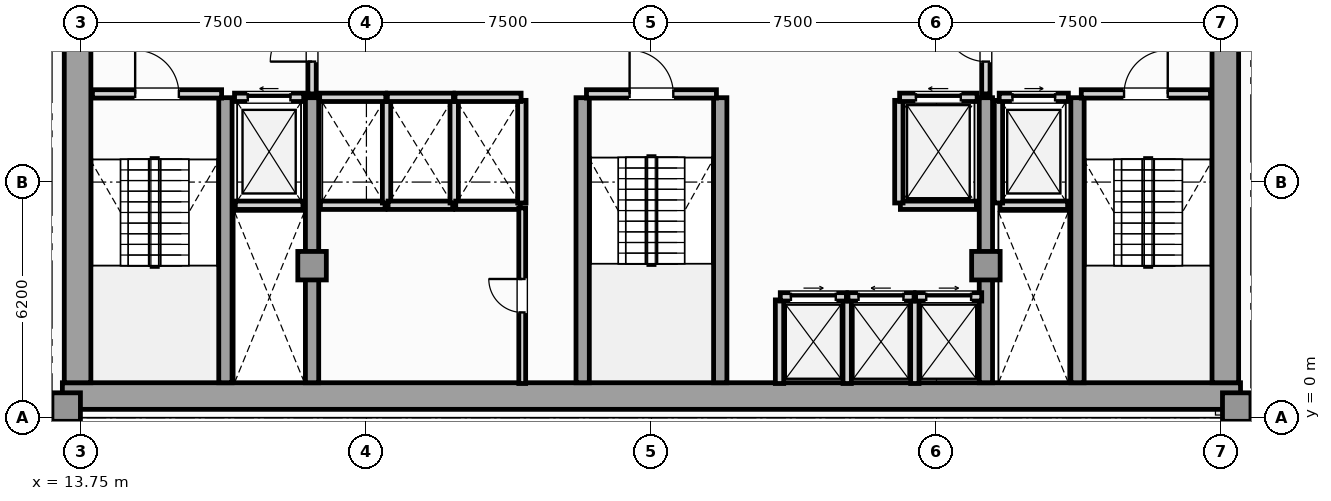
"""IFC4 building model, lengths in metres.
Left out: names, types, materials, properties, quantities, classifications, styles, units other than length and angle.
Written with IfcOpenShell. Run it as: python <this file> out.ifc"""

import sys

from ifc_helpers import new_model, si_unit, direction, frame, frame_2d, origin, origin_2d, place, context, subcontext, project, spatial, rectangle, extrude, element, fill, save


model = new_model("IFC4")
c1 = context("Model", 3, precision=1e-05, world=origin(), true_north=direction((0.0, 1.0)))
c2 = subcontext(c1, "Body", "Model", "MODEL_VIEW")
j1 = project(units=[si_unit("LENGTHUNIT", "METRE"), si_unit("PLANEANGLEUNIT", "RADIAN")], contexts=[c1])
p1 = place(None, origin())
s1 = spatial("IfcSite", under=j1, at=p1, CompositionType="ELEMENT")
p2 = place(p1, origin())
s2 = spatial("IfcBuilding", under=s1, at=p2, CompositionType="ELEMENT")
p3 = place(p2, frame((0.0, 0.0, 183.7)))
s3 = spatial("IfcBuildingStorey", under=s2, at=p3, CompositionType="ELEMENT", Elevation=183.7)
p4 = place(p3, frame((13.25, 0.57, 0.0), z_axis=(0.0, 0.0, 1.0), x_axis=(1.0, 0.0, 0.0)))
e1 = element("IfcWall", 1, at=p4, inside=s3, PredefinedType="SHEAR", context=c2, shape_type="SweptSolid", body=[
    extrude(rectangle(XDim=31.0, YDim=0.7, at=frame_2d((15.5, 0.0))), origin(), (0.0, 0.0, 1.0), 3.63),
])
for number, where, z_axis, x_axis in (
    (2, (13.65, 0.92, 0.0), (0.0, 0.0, 1.0), (0.0, 1.0, 0.0)),
    (3, (43.85, 0.92, 0.0), (0.0, 0.0, 1.0), (0.0, 1.0, 0.0)),
):
    element("IfcWall", number, at=place(p3, frame(where, z_axis=z_axis, x_axis=x_axis)), inside=s3, PredefinedType="SHEAR", context=c2, shape_type="SweptSolid", body=[
        extrude(rectangle(XDim=10.53, YDim=0.7, at=frame_2d((5.265, 0.0))), origin(), (0.0, 0.0, 1.0), 3.63),
    ])
for number, where, z_axis, x_axis in (
    (4, (17.54, 0.92, 0.0), (0.0, 0.0, 1.0), (0.0, 1.0, 0.0)),
    (5, (19.82, 0.92, 0.0), (0.0, 0.0, 1.0), (0.0, 1.0, 0.0)),
    (6, (26.94, 0.92, 0.0), (0.0, 0.0, 1.0), (0.0, 1.0, 0.0)),
    (7, (30.56, 0.92, 0.0), (0.0, 0.0, 1.0), (0.0, 1.0, 0.0)),
    (8, (37.55, 0.92, 0.0), (0.0, 0.0, 1.0), (0.0, 1.0, 0.0)),
    (9, (39.96, 0.92, 0.0), (0.0, 0.0, 1.0), (0.0, 1.0, 0.0)),
):
    element("IfcWall", number, at=place(p3, frame(where, z_axis=z_axis, x_axis=x_axis)), inside=s3, PredefinedType="SHEAR", context=c2, shape_type="SweptSolid", body=[
        extrude(rectangle(XDim=7.5, YDim=0.35, at=frame_2d((3.75, 0.0))), origin(), (0.0, 0.0, 1.0), 3.63),
    ])
for number, where, z_axis, x_axis in (
    (10, (13.35, 0.28, 0.0), (0.0, 0.0, 1.0), (1.0, 0.0, 0.0)),
    (11, (44.15, 0.28, 0.0), (0.0, 0.0, 1.0), (1.0, 0.0, 0.0)),
    (12, (19.82, 4.0, 0.0), (0.0, 0.0, 1.0), (1.0, 0.0, 0.0)),
    (13, (37.55, 4.0, 0.0), (0.0, 0.0, 1.0), (1.0, 0.0, 0.0)),
):
    element("IfcColumn", number, at=place(p3, frame(where, z_axis=z_axis, x_axis=x_axis)), inside=s3, PredefinedType="COLUMN", context=c2, shape_type="SweptSolid", body=[
        extrude(rectangle(XDim=0.75, YDim=0.75, at=origin_2d()), origin(), (0.0, 0.0, 1.0), 3.85),
    ])
p5 = place(p3, frame((8.44, 0.18, 0.0), z_axis=(0.0, 0.0, 1.0), x_axis=(1.0, 0.0, 0.0)))
e14 = element("IfcWall", 14, at=p5, inside=s3, PredefinedType="SOLIDWALL", context=c2, shape_type="SweptSolid", body=[
    extrude(rectangle(XDim=4.81, YDim=0.3, at=frame_2d((2.405, 0.0))), origin(), (0.0, 0.0, 1.0), 3.63),
])
p6 = place(p5, frame((1.355, 0.0, 0.85)))
e15 = element("IfcOpeningElement", 15, at=p6, cuts=e14, PredefinedType="OPENING", context=c2, shape_type="SweptSolid", body=[
    extrude(rectangle(XDim=2.1, YDim=2.05, at=frame_2d((1.05, 1.025))), frame((0.0, 0.16, 0.0), z_axis=(0.0, -1.0, 0.0), x_axis=(1.0, 0.0, 0.0)), (0.0, 0.0, 1.0), 0.32),
])
p7 = place(p3, frame((44.25, 0.18, 0.0), z_axis=(0.0, 0.0, 1.0), x_axis=(1.0, 0.0, 0.0)))
e16 = element("IfcWall", 16, at=p7, inside=s3, PredefinedType="SOLIDWALL", context=c2, shape_type="SweptSolid", body=[
    extrude(rectangle(XDim=4.81, YDim=0.3, at=frame_2d((2.405, 0.0))), origin(), (0.0, 0.0, 1.0), 3.63),
])
p8 = place(p7, frame((1.58, 0.0, 0.88)))
e17 = element("IfcOpeningElement", 17, at=p8, cuts=e16, PredefinedType="OPENING", context=c2, shape_type="SweptSolid", body=[
    extrude(rectangle(XDim=1.65, YDim=2.0, at=frame_2d((0.825, 1.0))), frame((0.0, 0.16, 0.0), z_axis=(0.0, -1.0, 0.0), x_axis=(1.0, 0.0, 0.0)), (0.0, 0.0, 1.0), 0.32),
])
p9 = place(p3, frame((17.8, 5.59, 0.0), z_axis=(0.0, 0.0, 1.0), x_axis=(1.0, 0.0, 0.0)))
e18 = element("IfcWall", 18, at=p9, inside=s3, PredefinedType="SOLIDWALL", context=c2, shape_type="SweptSolid", body=[
    extrude(rectangle(XDim=1.78, YDim=0.22, at=frame_2d((0.89, 0.0))), origin(), (0.0, 0.0, 1.0), 3.63),
])
p10 = place(p3, frame((17.78, 8.43, 0.0), z_axis=(0.0, 0.0, 1.0), x_axis=(1.0, 0.0, 0.0)))
e19 = element("IfcWall", 19, at=p10, inside=s3, PredefinedType="SOLIDWALL", context=c2, shape_type="SweptSolid", body=[
    extrude(rectangle(XDim=1.82, YDim=0.22, at=frame_2d((0.91, 0.0))), origin(), (0.0, 0.0, 1.0), 3.63),
])
p11 = place(p10, frame((0.35, 0.0, 0.0)))
e20 = element("IfcOpeningElement", 20, at=p11, cuts=e19, PredefinedType="OPENING", context=c2, shape_type="SweptSolid", body=[
    extrude(rectangle(XDim=1.12, YDim=2.25, at=frame_2d((0.56, 1.125))), frame((0.0, 0.12, 0.0), z_axis=(0.0, -1.0, 0.0), x_axis=(1.0, 0.0, 0.0)), (0.0, 0.0, 1.0), 0.24),
])
p12 = place(p3, frame((37.92, 5.59, 0.0), z_axis=(0.0, 0.0, 1.0), x_axis=(1.0, 0.0, 0.0)))
e21 = element("IfcWall", 21, at=p12, inside=s3, PredefinedType="SOLIDWALL", context=c2, shape_type="SweptSolid", body=[
    extrude(rectangle(XDim=1.78, YDim=0.22, at=frame_2d((0.89, 0.0))), origin(), (0.0, 0.0, 1.0), 3.63),
])
p13 = place(p3, frame((37.88, 5.65, 0.0), z_axis=(0.0, 0.0, 1.0), x_axis=(0.0, 1.0, 0.0)))
e22 = element("IfcWall", 22, at=p13, inside=s3, PredefinedType="SOLIDWALL", context=c2, shape_type="SweptSolid", body=[
    extrude(rectangle(XDim=2.7, YDim=0.22, at=frame_2d((1.35, 0.0))), origin(), (0.0, 0.0, 1.0), 3.63),
])
p14 = place(p3, frame((37.9, 8.43, 0.0), z_axis=(0.0, 0.0, 1.0), x_axis=(1.0, 0.0, 0.0)))
e23 = element("IfcWall", 23, at=p14, inside=s3, PredefinedType="SOLIDWALL", context=c2, shape_type="SweptSolid", body=[
    extrude(rectangle(XDim=1.82, YDim=0.22, at=frame_2d((0.91, 0.0))), origin(), (0.0, 0.0, 1.0), 3.63),
])
p15 = place(p14, frame((0.35, 0.0, 0.0)))
e24 = element("IfcOpeningElement", 24, at=p15, cuts=e23, PredefinedType="OPENING", context=c2, shape_type="SweptSolid", body=[
    extrude(rectangle(XDim=1.12, YDim=2.25, at=frame_2d((0.56, 1.125))), frame((0.0, 0.12, 0.0), z_axis=(0.0, -1.0, 0.0), x_axis=(1.0, 0.0, 0.0)), (0.0, 0.0, 1.0), 0.24),
])
p16 = place(p3, frame((35.3, 5.59, 0.0), z_axis=(0.0, 0.0, 1.0), x_axis=(1.0, 0.0, 0.0)))
e25 = element("IfcWall", 25, at=p16, inside=s3, PredefinedType="SOLIDWALL", context=c2, shape_type="SweptSolid", body=[
    extrude(rectangle(XDim=2.0, YDim=0.22, at=frame_2d((1.0, 0.0))), origin(), (0.0, 0.0, 1.0), 3.63),
])
p17 = place(p3, frame((35.26, 5.65, 0.0), z_axis=(0.0, 0.0, 1.0), x_axis=(0.0, 1.0, 0.0)))
e26 = element("IfcWall", 26, at=p17, inside=s3, PredefinedType="SOLIDWALL", context=c2, shape_type="SweptSolid", body=[
    extrude(rectangle(XDim=2.7, YDim=0.22, at=frame_2d((1.35, 0.0))), origin(), (0.0, 0.0, 1.0), 3.63),
])
p18 = place(p3, frame((35.28, 8.43, 0.0), z_axis=(0.0, 0.0, 1.0), x_axis=(1.0, 0.0, 0.0)))
e27 = element("IfcWall", 27, at=p18, inside=s3, PredefinedType="SOLIDWALL", context=c2, shape_type="SweptSolid", body=[
    extrude(rectangle(XDim=2.04, YDim=0.22, at=frame_2d((1.02, 0.0))), origin(), (0.0, 0.0, 1.0), 3.63),
])
p19 = place(p18, frame((0.43, 0.0, 0.0)))
e28 = element("IfcOpeningElement", 28, at=p19, cuts=e27, PredefinedType="OPENING", context=c2, shape_type="SweptSolid", body=[
    extrude(rectangle(XDim=1.18, YDim=2.2, at=frame_2d((0.59, 1.1))), frame((0.0, 0.12, 0.0), z_axis=(0.0, -1.0, 0.0), x_axis=(1.0, 0.0, 0.0)), (0.0, 0.0, 1.0), 0.24),
])
for number, where, z_axis, x_axis in (
    (29, (32.12, 0.9, 0.0), (0.0, 0.0, 1.0), (0.0, 1.0, 0.0)),
    (30, (33.9, 0.9, 0.0), (0.0, 0.0, 1.0), (0.0, 1.0, 0.0)),
):
    element("IfcWall", number, at=place(p3, frame(where, z_axis=z_axis, x_axis=x_axis)), inside=s3, PredefinedType="SOLIDWALL", context=c2, shape_type="SweptSolid", body=[
        extrude(rectangle(XDim=2.2, YDim=0.22, at=frame_2d((1.1, 0.0))), origin(), (0.0, 0.0, 1.0), 3.63),
    ])
p20 = place(p3, frame((32.14, 3.18, 0.0), z_axis=(0.0, 0.0, 1.0), x_axis=(1.0, 0.0, 0.0)))
e31 = element("IfcWall", 31, at=p20, inside=s3, PredefinedType="SOLIDWALL", context=c2, shape_type="SweptSolid", body=[
    extrude(rectangle(XDim=1.74, YDim=0.22, at=frame_2d((0.87, 0.0))), origin(), (0.0, 0.0, 1.0), 3.63),
])
p21 = place(p20, frame((0.28, 0.0, 0.0)))
e32 = element("IfcOpeningElement", 32, at=p21, cuts=e31, PredefinedType="OPENING", context=c2, shape_type="SweptSolid", body=[
    extrude(rectangle(XDim=1.18, YDim=2.2, at=frame_2d((0.59, 1.1))), frame((0.0, 0.12, 0.0), z_axis=(0.0, -1.0, 0.0), x_axis=(1.0, 0.0, 0.0)), (0.0, 0.0, 1.0), 0.24),
])
p22 = place(p3, frame((35.68, 0.9, 0.0), z_axis=(0.0, 0.0, 1.0), x_axis=(0.0, 1.0, 0.0)))
e33 = element("IfcWall", 33, at=p22, inside=s3, PredefinedType="SOLIDWALL", context=c2, shape_type="SweptSolid", body=[
    extrude(rectangle(XDim=2.2, YDim=0.22, at=frame_2d((1.1, 0.0))), origin(), (0.0, 0.0, 1.0), 3.63),
])
p23 = place(p3, frame((33.92, 3.18, 0.0), z_axis=(0.0, 0.0, 1.0), x_axis=(1.0, 0.0, 0.0)))
e34 = element("IfcWall", 34, at=p23, inside=s3, PredefinedType="SOLIDWALL", context=c2, shape_type="SweptSolid", body=[
    extrude(rectangle(XDim=1.74, YDim=0.22, at=frame_2d((0.87, 0.0))), origin(), (0.0, 0.0, 1.0), 3.63),
])
p24 = place(p23, frame((0.28, 0.0, 0.0)))
e35 = element("IfcOpeningElement", 35, at=p24, cuts=e34, PredefinedType="OPENING", context=c2, shape_type="SweptSolid", body=[
    extrude(rectangle(XDim=1.18, YDim=2.2, at=frame_2d((0.59, 1.1))), frame((0.0, 0.12, 0.0), z_axis=(0.0, -1.0, 0.0), x_axis=(1.0, 0.0, 0.0)), (0.0, 0.0, 1.0), 0.24),
])
p25 = place(p3, frame((35.7, 3.18, 0.0), z_axis=(0.0, 0.0, 1.0), x_axis=(1.0, 0.0, 0.0)))
e36 = element("IfcWall", 36, at=p25, inside=s3, PredefinedType="SOLIDWALL", context=c2, shape_type="SweptSolid", body=[
    extrude(rectangle(XDim=1.74, YDim=0.22, at=frame_2d((0.87, 0.0))), origin(), (0.0, 0.0, 1.0), 3.63),
])
p26 = place(p25, frame((0.28, 0.0, 0.0)))
e37 = element("IfcOpeningElement", 37, at=p26, cuts=e36, PredefinedType="OPENING", context=c2, shape_type="SweptSolid", body=[
    extrude(rectangle(XDim=1.18, YDim=2.2, at=frame_2d((0.59, 1.1))), frame((0.0, 0.12, 0.0), z_axis=(0.0, -1.0, 0.0), x_axis=(1.0, 0.0, 0.0)), (0.0, 0.0, 1.0), 0.24),
])
p27 = place(p3, frame((20.04, 5.59, 0.0), z_axis=(0.0, 0.0, 1.0), x_axis=(1.0, 0.0, 0.0)))
e38 = element("IfcWall", 38, at=p27, inside=s3, PredefinedType="SOLIDWALL", context=c2, shape_type="SweptSolid", body=[
    extrude(rectangle(XDim=1.7, YDim=0.22, at=frame_2d((0.85, 0.0))), origin(), (0.0, 0.0, 1.0), 3.63),
])
p28 = place(p3, frame((21.78, 5.65, 0.0), z_axis=(0.0, 0.0, 1.0), x_axis=(0.0, 1.0, 0.0)))
e39 = element("IfcWall", 39, at=p28, inside=s3, PredefinedType="SOLIDWALL", context=c2, shape_type="SweptSolid", body=[
    extrude(rectangle(XDim=2.7, YDim=0.22, at=frame_2d((1.35, 0.0))), origin(), (0.0, 0.0, 1.0), 3.63),
])
p29 = place(p3, frame((20.02, 8.43, 0.0), z_axis=(0.0, 0.0, 1.0), x_axis=(1.0, 0.0, 0.0)))
e40 = element("IfcWall", 40, at=p29, inside=s3, PredefinedType="SOLIDWALL", context=c2, shape_type="SweptSolid", body=[
    extrude(rectangle(XDim=1.74, YDim=0.22, at=frame_2d((0.87, 0.0))), origin(), (0.0, 0.0, 1.0), 3.63),
])
p30 = place(p3, frame((21.82, 5.59, 0.0), z_axis=(0.0, 0.0, 1.0), x_axis=(1.0, 0.0, 0.0)))
e41 = element("IfcWall", 41, at=p30, inside=s3, PredefinedType="SOLIDWALL", context=c2, shape_type="SweptSolid", body=[
    extrude(rectangle(XDim=1.7, YDim=0.22, at=frame_2d((0.85, 0.0))), origin(), (0.0, 0.0, 1.0), 3.63),
])
p31 = place(p3, frame((23.56, 5.65, 0.0), z_axis=(0.0, 0.0, 1.0), x_axis=(0.0, 1.0, 0.0)))
e42 = element("IfcWall", 42, at=p31, inside=s3, PredefinedType="SOLIDWALL", context=c2, shape_type="SweptSolid", body=[
    extrude(rectangle(XDim=2.7, YDim=0.22, at=frame_2d((1.35, 0.0))), origin(), (0.0, 0.0, 1.0), 3.63),
])
p32 = place(p3, frame((21.8, 8.43, 0.0), z_axis=(0.0, 0.0, 1.0), x_axis=(1.0, 0.0, 0.0)))
e43 = element("IfcWall", 43, at=p32, inside=s3, PredefinedType="SOLIDWALL", context=c2, shape_type="SweptSolid", body=[
    extrude(rectangle(XDim=1.74, YDim=0.22, at=frame_2d((0.87, 0.0))), origin(), (0.0, 0.0, 1.0), 3.63),
])
p33 = place(p3, frame((23.6, 5.59, 0.0), z_axis=(0.0, 0.0, 1.0), x_axis=(1.0, 0.0, 0.0)))
e44 = element("IfcWall", 44, at=p33, inside=s3, PredefinedType="SOLIDWALL", context=c2, shape_type="SweptSolid", body=[
    extrude(rectangle(XDim=1.7, YDim=0.22, at=frame_2d((0.85, 0.0))), origin(), (0.0, 0.0, 1.0), 3.63),
])
p34 = place(p3, frame((25.34, 5.65, 0.0), z_axis=(0.0, 0.0, 1.0), x_axis=(0.0, 1.0, 0.0)))
e45 = element("IfcWall", 45, at=p34, inside=s3, PredefinedType="SOLIDWALL", context=c2, shape_type="SweptSolid", body=[
    extrude(rectangle(XDim=2.7, YDim=0.22, at=frame_2d((1.35, 0.0))), origin(), (0.0, 0.0, 1.0), 3.63),
])
p35 = place(p3, frame((23.58, 8.43, 0.0), z_axis=(0.0, 0.0, 1.0), x_axis=(1.0, 0.0, 0.0)))
e46 = element("IfcWall", 46, at=p35, inside=s3, PredefinedType="SOLIDWALL", context=c2, shape_type="SweptSolid", body=[
    extrude(rectangle(XDim=1.74, YDim=0.22, at=frame_2d((0.87, 0.0))), origin(), (0.0, 0.0, 1.0), 3.63),
])
p36 = place(p3, frame((14.04, 8.52, 0.0), z_axis=(0.0, 0.0, 1.0), x_axis=(1.0, 0.0, 0.0)))
e47 = element("IfcWall", 47, at=p36, inside=s3, PredefinedType="SOLIDWALL", context=c2, shape_type="SweptSolid", body=[
    extrude(rectangle(XDim=3.4, YDim=0.22, at=frame_2d((1.7, 0.0))), origin(), (0.0, 0.0, 1.0), 3.63),
])
p37 = place(p36, frame((1.125, 0.0, 0.0)))
e48 = element("IfcOpeningElement", 48, at=p37, cuts=e47, PredefinedType="OPENING", context=c2, shape_type="SweptSolid", body=[
    extrude(rectangle(XDim=1.15, YDim=2.2, at=frame_2d((0.575, 1.1))), frame((0.0, 0.12, 0.0), z_axis=(0.0, -1.0, 0.0), x_axis=(1.0, 0.0, 0.0)), (0.0, 0.0, 1.0), 0.24),
])
p38 = place(p3, frame((40.06, 8.52, 0.0), z_axis=(0.0, 0.0, 1.0), x_axis=(1.0, 0.0, 0.0)))
e49 = element("IfcWall", 49, at=p38, inside=s3, PredefinedType="SOLIDWALL", context=c2, shape_type="SweptSolid", body=[
    extrude(rectangle(XDim=3.4, YDim=0.22, at=frame_2d((1.7, 0.0))), origin(), (0.0, 0.0, 1.0), 3.63),
])
p39 = place(p38, frame((1.125, 0.0, 0.0)))
e50 = element("IfcOpeningElement", 50, at=p39, cuts=e49, PredefinedType="OPENING", context=c2, shape_type="SweptSolid", body=[
    extrude(rectangle(XDim=1.15, YDim=2.2, at=frame_2d((0.575, 1.1))), frame((0.0, 0.12, 0.0), z_axis=(0.0, -1.0, 0.0), x_axis=(1.0, 0.0, 0.0)), (0.0, 0.0, 1.0), 0.24),
])
p40 = place(p3, frame((27.04, 8.52, 0.0), z_axis=(0.0, 0.0, 1.0), x_axis=(1.0, 0.0, 0.0)))
e51 = element("IfcWall", 51, at=p40, inside=s3, PredefinedType="SOLIDWALL", context=c2, shape_type="SweptSolid", body=[
    extrude(rectangle(XDim=3.42, YDim=0.22, at=frame_2d((1.71, 0.0))), origin(), (0.0, 0.0, 1.0), 3.63),
])
p41 = place(p40, frame((1.135, 0.0, 0.0)))
e52 = element("IfcOpeningElement", 52, at=p41, cuts=e51, PredefinedType="OPENING", context=c2, shape_type="SweptSolid", body=[
    extrude(rectangle(XDim=1.15, YDim=2.2, at=frame_2d((0.575, 1.1))), frame((0.0, 0.12, 0.0), z_axis=(0.0, -1.0, 0.0), x_axis=(1.0, 0.0, 0.0)), (0.0, 0.0, 1.0), 0.24),
])
p42 = place(p3, frame((19.82, 8.52, 0.0), z_axis=(0.0, 0.0, 1.0), x_axis=(0.0, 1.0, 0.0)))
e53 = element("IfcWall", 53, at=p42, inside=s3, PredefinedType="SOLIDWALL", context=c2, shape_type="SweptSolid", body=[
    extrude(rectangle(XDim=2.8, YDim=0.22, at=frame_2d((1.4, 0.0))), origin(), (0.0, 0.0, 1.0), 3.085),
])
p43 = place(p42, frame((0.85, 0.0, 0.0)))
e54 = element("IfcOpeningElement", 54, at=p43, cuts=e53, PredefinedType="OPENING", context=c2, shape_type="SweptSolid", body=[
    extrude(rectangle(XDim=1.1, YDim=2.2, at=frame_2d((0.55, 1.1))), frame((0.0, 0.12, 0.0), z_axis=(0.0, -1.0, 0.0), x_axis=(1.0, 0.0, 0.0)), (0.0, 0.0, 1.0), 0.24),
])
p44 = place(p3, frame((37.55, 8.52, 0.0), z_axis=(0.0, 0.0, 1.0), x_axis=(0.0, 1.0, 0.0)))
e55 = element("IfcWall", 55, at=p44, inside=s3, PredefinedType="SOLIDWALL", context=c2, shape_type="SweptSolid", body=[
    extrude(rectangle(XDim=2.8, YDim=0.22, at=frame_2d((1.4, 0.0))), origin(), (0.0, 0.0, 1.0), 3.085),
])
p45 = place(p44, frame((0.85, 0.0, 0.0)))
e56 = element("IfcOpeningElement", 56, at=p45, cuts=e55, PredefinedType="OPENING", context=c2, shape_type="SweptSolid", body=[
    extrude(rectangle(XDim=1.1, YDim=2.2, at=frame_2d((0.55, 1.1))), frame((0.0, 0.12, 0.0), z_axis=(0.0, -1.0, 0.0), x_axis=(1.0, 0.0, 0.0)), (0.0, 0.0, 1.0), 0.24),
])
p46 = place(p3, frame((25.35, 0.9, 0.0), z_axis=(0.0, 0.0, 1.0), x_axis=(0.0, 1.0, 0.0)))
e57 = element("IfcWall", 57, at=p46, inside=s3, PredefinedType="PARTITIONING", context=c2, shape_type="SweptSolid", body=[
    extrude(rectangle(XDim=4.62, YDim=0.18, at=frame_2d((2.31, 0.0))), origin(), (0.0, 0.0, 1.0), 3.63),
])
p47 = place(p46, frame((1.87, 0.0, 0.0)))
e58 = element("IfcOpeningElement", 58, at=p47, cuts=e57, PredefinedType="OPENING", context=c2, shape_type="SweptSolid", body=[
    extrude(rectangle(XDim=0.88, YDim=2.05, at=frame_2d((0.44, 1.025))), frame((0.0, 0.1, 0.0), z_axis=(0.0, -1.0, 0.0), x_axis=(1.0, 0.0, 0.0)), (0.0, 0.0, 1.0), 0.2),
])
p48 = place(p11, origin())
e59 = element("IfcDoor", 59, at=p48, inside=s3, OperationType="SLIDING_TO_LEFT", PredefinedType="DOOR", context=c2, shape_type="SweptSolid", body=[
    extrude(rectangle(XDim=1.12, YDim=2.25, at=frame_2d((0.56, 1.125))), frame((0.0, 0.025, 0.0), z_axis=(0.0, -1.0, 0.0), x_axis=(1.0, 0.0, 0.0)), (0.0, 0.0, 1.0), 0.05),
])
fill(e20, e59)
p49 = place(p15, origin())
e60 = element("IfcDoor", 60, at=p49, inside=s3, OperationType="SLIDING_TO_RIGHT", PredefinedType="DOOR", context=c2, shape_type="SweptSolid", body=[
    extrude(rectangle(XDim=1.12, YDim=2.25, at=frame_2d((0.56, 1.125))), frame((0.0, 0.025, 0.0), z_axis=(0.0, -1.0, 0.0), x_axis=(1.0, 0.0, 0.0)), (0.0, 0.0, 1.0), 0.05),
])
fill(e24, e60)
p50 = place(p19, origin())
e61 = element("IfcDoor", 61, at=p50, inside=s3, OperationType="SLIDING_TO_LEFT", PredefinedType="DOOR", context=c2, shape_type="SweptSolid", body=[
    extrude(rectangle(XDim=1.18, YDim=2.2, at=frame_2d((0.59, 1.1))), frame((0.0, 0.025, 0.0), z_axis=(0.0, -1.0, 0.0), x_axis=(1.0, 0.0, 0.0)), (0.0, 0.0, 1.0), 0.05),
])
fill(e28, e61)
p51 = place(p21, origin())
e62 = element("IfcDoor", 62, at=p51, inside=s3, OperationType="SLIDING_TO_RIGHT", PredefinedType="DOOR", context=c2, shape_type="SweptSolid", body=[
    extrude(rectangle(XDim=1.18, YDim=2.2, at=frame_2d((0.59, 1.1))), frame((0.0, 0.025, 0.0), z_axis=(0.0, -1.0, 0.0), x_axis=(1.0, 0.0, 0.0)), (0.0, 0.0, 1.0), 0.05),
])
fill(e32, e62)
p52 = place(p24, origin())
e63 = element("IfcDoor", 63, at=p52, inside=s3, OperationType="SLIDING_TO_LEFT", PredefinedType="DOOR", context=c2, shape_type="SweptSolid", body=[
    extrude(rectangle(XDim=1.18, YDim=2.2, at=frame_2d((0.59, 1.1))), frame((0.0, 0.025, 0.0), z_axis=(0.0, -1.0, 0.0), x_axis=(1.0, 0.0, 0.0)), (0.0, 0.0, 1.0), 0.05),
])
fill(e35, e63)
p53 = place(p26, origin())
e64 = element("IfcDoor", 64, at=p53, inside=s3, OperationType="SLIDING_TO_RIGHT", PredefinedType="DOOR", context=c2, shape_type="SweptSolid", body=[
    extrude(rectangle(XDim=1.18, YDim=2.2, at=frame_2d((0.59, 1.1))), frame((0.0, 0.025, 0.0), z_axis=(0.0, -1.0, 0.0), x_axis=(1.0, 0.0, 0.0)), (0.0, 0.0, 1.0), 0.05),
])
fill(e37, e64)
p54 = place(p37, origin())
e65 = element("IfcDoor", 65, at=p54, inside=s3, OperationType="SINGLE_SWING_LEFT", PredefinedType="DOOR", context=c2, shape_type="SweptSolid", body=[
    extrude(rectangle(XDim=1.15, YDim=2.2, at=frame_2d((0.575, 1.1))), frame((0.0, 0.025, 0.0), z_axis=(0.0, -1.0, 0.0), x_axis=(1.0, 0.0, 0.0)), (0.0, 0.0, 1.0), 0.05),
])
fill(e48, e65)
p55 = place(p39, origin())
e66 = element("IfcDoor", 66, at=p55, inside=s3, OperationType="SINGLE_SWING_RIGHT", PredefinedType="DOOR", context=c2, shape_type="SweptSolid", body=[
    extrude(rectangle(XDim=1.15, YDim=2.2, at=frame_2d((0.575, 1.1))), frame((0.0, 0.025, 0.0), z_axis=(0.0, -1.0, 0.0), x_axis=(1.0, 0.0, 0.0)), (0.0, 0.0, 1.0), 0.05),
])
fill(e50, e66)
p56 = place(p41, origin())
e67 = element("IfcDoor", 67, at=p56, inside=s3, OperationType="SINGLE_SWING_LEFT", PredefinedType="DOOR", context=c2, shape_type="SweptSolid", body=[
    extrude(rectangle(XDim=1.15, YDim=2.2, at=frame_2d((0.575, 1.1))), frame((0.0, 0.025, 0.0), z_axis=(0.0, -1.0, 0.0), x_axis=(1.0, 0.0, 0.0)), (0.0, 0.0, 1.0), 0.05),
])
fill(e52, e67)
p57 = place(p43, origin())
e68 = element("IfcDoor", 68, at=p57, inside=s3, OperationType="SINGLE_SWING_LEFT", PredefinedType="DOOR", context=c2, shape_type="SweptSolid", body=[
    extrude(rectangle(XDim=1.1, YDim=2.2, at=frame_2d((0.55, 1.1))), frame((0.0, 0.025, 0.0), z_axis=(0.0, -1.0, 0.0), x_axis=(1.0, 0.0, 0.0)), (0.0, 0.0, 1.0), 0.05),
])
fill(e54, e68)
p58 = place(p45, origin())
e69 = element("IfcDoor", 69, at=p58, inside=s3, OperationType="SINGLE_SWING_RIGHT", PredefinedType="DOOR", context=c2, shape_type="SweptSolid", body=[
    extrude(rectangle(XDim=1.1, YDim=2.2, at=frame_2d((0.55, 1.1))), frame((0.0, 0.025, 0.0), z_axis=(0.0, -1.0, 0.0), x_axis=(1.0, 0.0, 0.0)), (0.0, 0.0, 1.0), 0.05),
])
fill(e56, e69)
p59 = place(p47, origin())
e70 = element("IfcDoor", 70, at=p59, inside=s3, OperationType="SINGLE_SWING_RIGHT", PredefinedType="DOOR", context=c2, shape_type="SweptSolid", body=[
    extrude(rectangle(XDim=0.88, YDim=2.05, at=frame_2d((0.44, 1.025))), frame((0.0, 0.025, 0.0), z_axis=(0.0, -1.0, 0.0), x_axis=(1.0, 0.0, 0.0)), (0.0, 0.0, 1.0), 0.05),
])
fill(e58, e70)
save(model, sys.argv[1])
